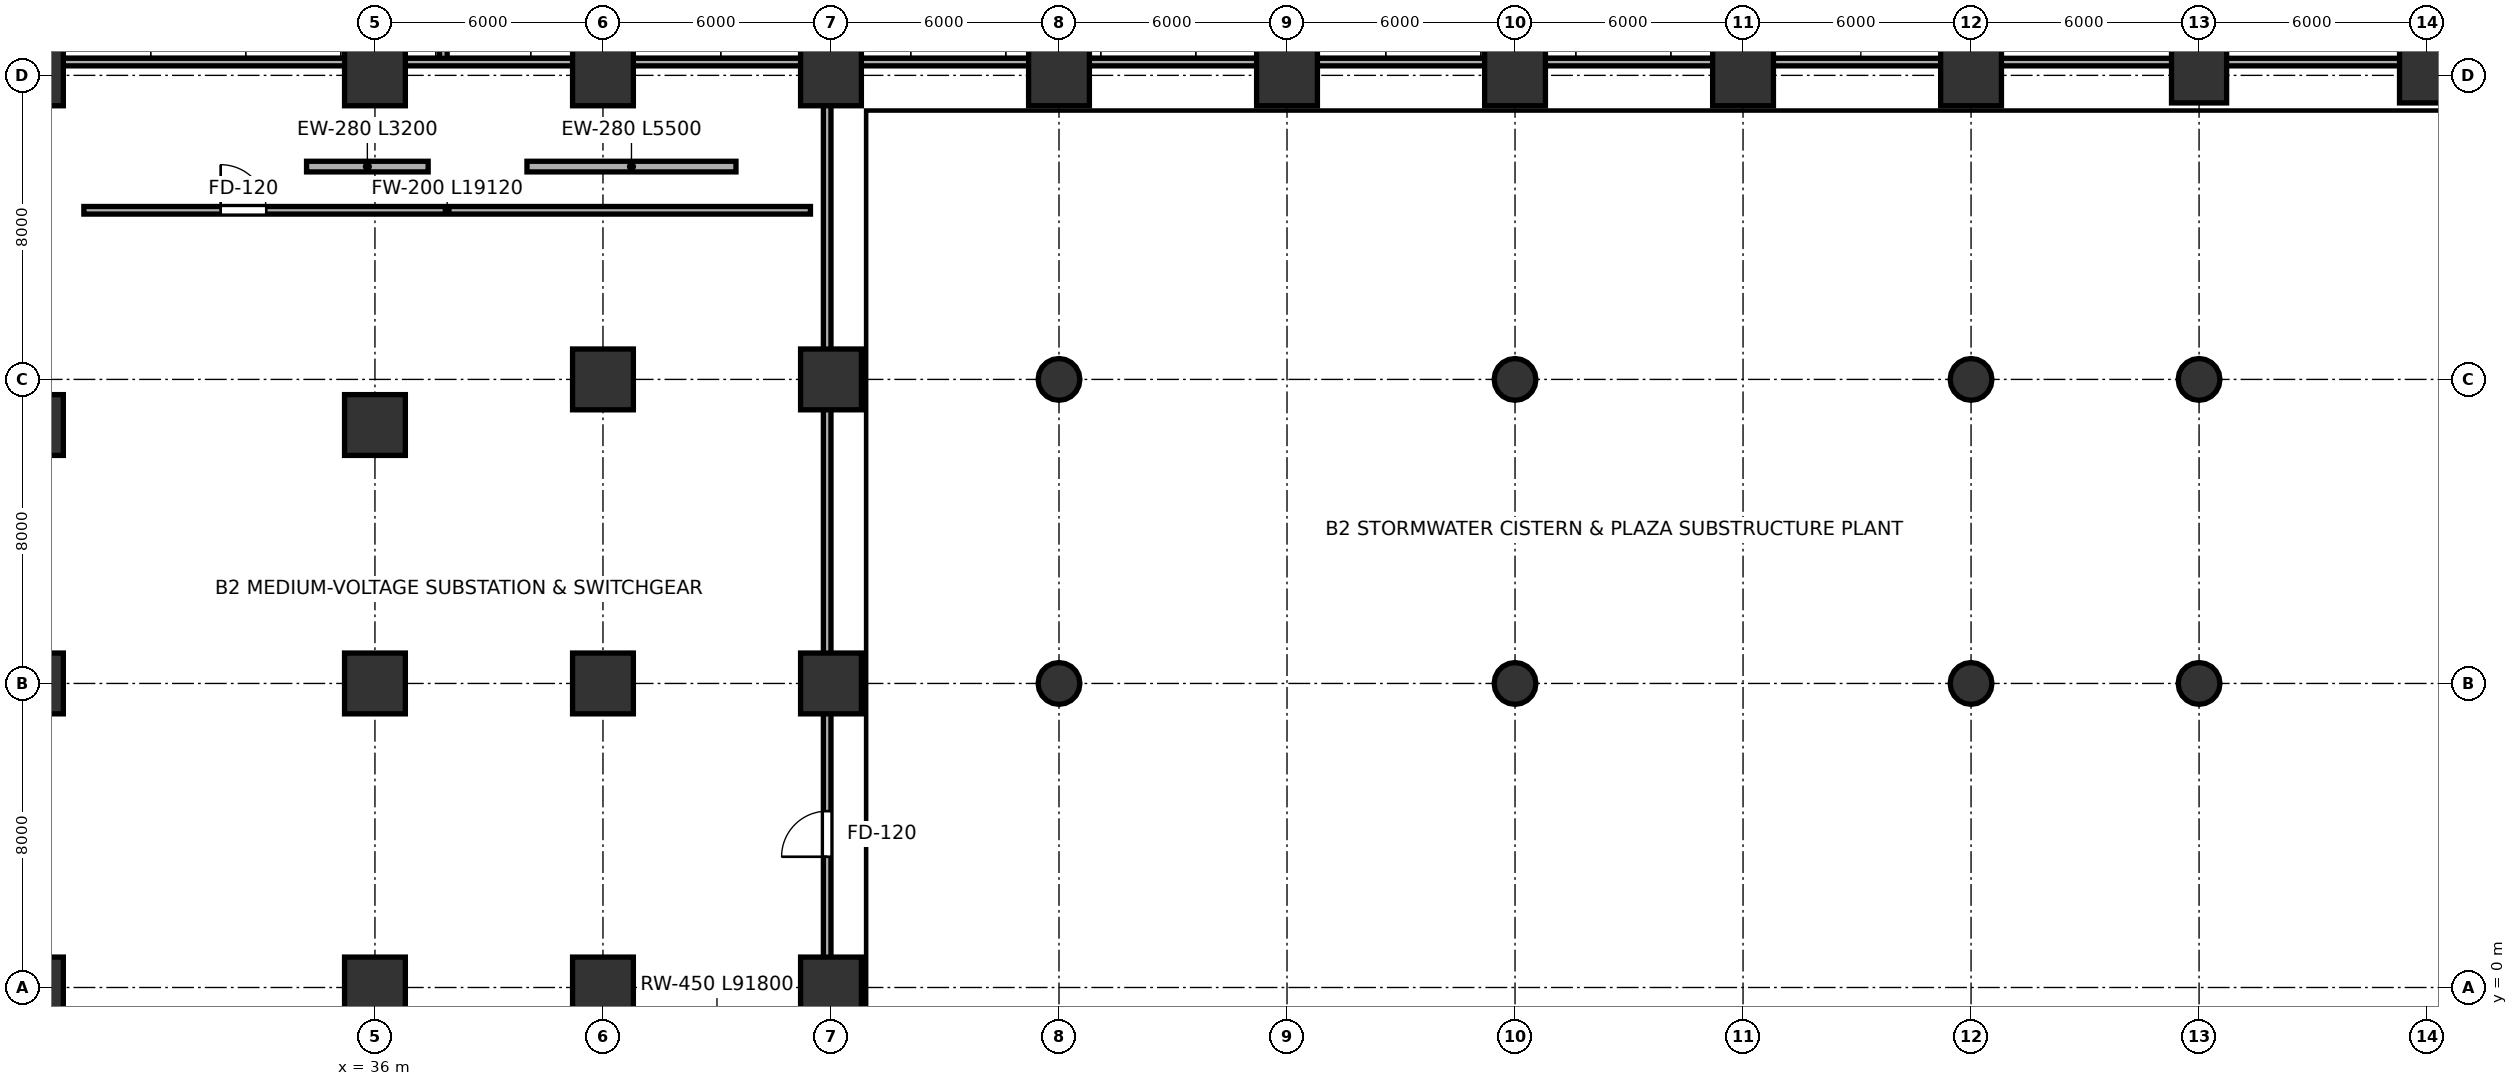
"""IFC4 building model, lengths in metres.
Left out: names, types, materials, properties, quantities, classifications, styles, units other than length and angle.
Written with IfcOpenShell. Run it as: python <this file> out.ifc"""

import sys

from ifc_helpers import new_model, si_unit, direction, frame, frame_2d, origin, origin_2d, place, context, subcontext, project, spatial, rectangle, circle, extrude, source, transform, mapped, element, fill, save


model = new_model("IFC4")
c1 = context("Model", 3, precision=1e-05, world=origin(), true_north=direction((0.0, 1.0)))
c2 = subcontext(c1, "Body", "Model", "MODEL_VIEW")
j1 = project(units=[si_unit("LENGTHUNIT", "METRE"), si_unit("PLANEANGLEUNIT", "RADIAN")], contexts=[c1])
p1 = place(None, origin())
s1 = spatial("IfcSite", under=j1, at=p1, CompositionType="ELEMENT")
p2 = place(p1, origin())
s2 = spatial("IfcBuilding", under=s1, at=p2, CompositionType="ELEMENT")
p3 = place(p2, frame((0.0, 0.0, -9.6)))
s3 = spatial("IfcBuildingStorey", under=s2, at=p3, CompositionType="ELEMENT", Elevation=-9.6)
m1 = source(origin(), c2, "Body", "SweptSolid", [
    extrude(rectangle(XDim=1.6, YDim=1.6, at=origin_2d()), origin(), (0.0, 0.0, 1.0), 4.799),
])
p4 = place(p3, frame((27.0, 0.0, 0.0), z_axis=(0.0, 0.0, 1.0), x_axis=(1.0, 0.0, 0.0)))
e1 = element("IfcColumn", 1, at=p4, inside=s3, PredefinedType="COLUMN", context=c2, shape_type="MappedRepresentation", body=[
    mapped(m1, transform((0.0, 0.0, 0.0), scale=1.0)),
])
m2 = source(origin(), c2, "Body", "SweptSolid", [
    extrude(rectangle(XDim=1.6, YDim=1.6, at=origin_2d()), origin(), (0.0, 0.0, 1.0), 4.799),
])
for number, where, z_axis, x_axis in (
    (2, (27.0, 8.0, 0.0), (0.0, 0.0, 1.0), (1.0, 0.0, 0.0)),
    (3, (27.0, 24.0, 0.0), (0.0, 0.0, 1.0), (1.0, 0.0, 0.0)),
    (4, (27.0, 14.8, 0.0), (0.0, 0.0, 1.0), (1.0, 0.0, 0.0)),
):
    element("IfcColumn", number, at=place(p3, frame(where, z_axis=z_axis, x_axis=x_axis)), inside=s3, PredefinedType="COLUMN", context=c2, shape_type="MappedRepresentation", body=[
        mapped(m2, transform((0.0, 0.0, 0.0), scale=1.0)),
    ])
p5 = place(p3, frame((36.0, 0.0, 0.0), z_axis=(0.0, 0.0, 1.0), x_axis=(1.0, 0.0, 0.0)))
e5 = element("IfcColumn", 5, at=p5, inside=s3, PredefinedType="COLUMN", context=c2, shape_type="MappedRepresentation", body=[
    mapped(m1, transform((0.0, 0.0, 0.0), scale=1.0)),
])
for number, where, z_axis, x_axis in (
    (6, (36.0, 8.0, 0.0), (0.0, 0.0, 1.0), (1.0, 0.0, 0.0)),
    (7, (36.0, 24.0, 0.0), (0.0, 0.0, 1.0), (1.0, 0.0, 0.0)),
    (8, (36.0, 14.8, 0.0), (0.0, 0.0, 1.0), (1.0, 0.0, 0.0)),
):
    element("IfcColumn", number, at=place(p3, frame(where, z_axis=z_axis, x_axis=x_axis)), inside=s3, PredefinedType="COLUMN", context=c2, shape_type="MappedRepresentation", body=[
        mapped(m2, transform((0.0, 0.0, 0.0), scale=1.0)),
    ])
p6 = place(p3, frame((42.0, 0.0, 0.0), z_axis=(0.0, 0.0, 1.0), x_axis=(1.0, 0.0, 0.0)))
e9 = element("IfcColumn", 9, at=p6, inside=s3, PredefinedType="COLUMN", context=c2, shape_type="MappedRepresentation", body=[
    mapped(m1, transform((0.0, 0.0, 0.0), scale=1.0)),
])
for number, where, z_axis, x_axis in (
    (10, (42.0, 8.0, 0.0), (0.0, 0.0, 1.0), (1.0, 0.0, 0.0)),
    (11, (42.0, 16.0, 0.0), (0.0, 0.0, 1.0), (1.0, 0.0, 0.0)),
    (12, (42.0, 24.0, 0.0), (0.0, 0.0, 1.0), (1.0, 0.0, 0.0)),
):
    element("IfcColumn", number, at=place(p3, frame(where, z_axis=z_axis, x_axis=x_axis)), inside=s3, PredefinedType="COLUMN", context=c2, shape_type="MappedRepresentation", body=[
        mapped(m2, transform((0.0, 0.0, 0.0), scale=1.0)),
    ])
p7 = place(p3, frame((48.0, 0.0, 0.0), z_axis=(0.0, 0.0, 1.0), x_axis=(1.0, 0.0, 0.0)))
e13 = element("IfcColumn", 13, at=p7, inside=s3, PredefinedType="COLUMN", context=c2, shape_type="MappedRepresentation", body=[
    mapped(m1, transform((0.0, 0.0, 0.0), scale=1.0)),
])
for number, where, z_axis, x_axis in (
    (14, (48.0, 8.0, 0.0), (0.0, 0.0, 1.0), (1.0, 0.0, 0.0)),
    (15, (48.0, 16.0, 0.0), (0.0, 0.0, 1.0), (1.0, 0.0, 0.0)),
    (16, (48.0, 24.0, 0.0), (0.0, 0.0, 1.0), (1.0, 0.0, 0.0)),
    (17, (54.0, 24.0, 0.0), (0.0, 0.0, 1.0), (1.0, 0.0, 0.0)),
    (18, (60.0, 24.0, 0.0), (0.0, 0.0, 1.0), (1.0, 0.0, 0.0)),
    (19, (66.0, 24.0, 0.0), (0.0, 0.0, 1.0), (1.0, 0.0, 0.0)),
    (20, (72.0, 24.0, 0.0), (0.0, 0.0, 1.0), (1.0, 0.0, 0.0)),
    (21, (78.0, 24.0, 0.0), (0.0, 0.0, 1.0), (1.0, 0.0, 0.0)),
):
    element("IfcColumn", number, at=place(p3, frame(where, z_axis=z_axis, x_axis=x_axis)), inside=s3, PredefinedType="COLUMN", context=c2, shape_type="MappedRepresentation", body=[
        mapped(m2, transform((0.0, 0.0, 0.0), scale=1.0)),
    ])
m3 = source(origin(), c2, "Body", "SweptSolid", [
    extrude(rectangle(XDim=1.45, YDim=1.45, at=origin_2d()), origin(), (0.0, 0.0, 1.0), 4.799),
])
p8 = place(p3, frame((84.0, 24.0, 0.0), z_axis=(0.0, 0.0, 1.0), x_axis=(1.0, 0.0, 0.0)))
e22 = element("IfcColumn", 22, at=p8, inside=s3, PredefinedType="COLUMN", context=c2, shape_type="MappedRepresentation", body=[
    mapped(m3, transform((0.0, 0.0, 0.0), scale=1.0)),
])
m4 = source(origin(), c2, "Body", "SweptSolid", [
    extrude(rectangle(XDim=1.45, YDim=1.45, at=origin_2d()), origin(), (0.0, 0.0, 1.0), 4.799),
])
p9 = place(p3, frame((90.0, 24.0, 0.0), z_axis=(0.0, 0.0, 1.0), x_axis=(1.0, 0.0, 0.0)))
e23 = element("IfcColumn", 23, at=p9, inside=s3, PredefinedType="COLUMN", context=c2, shape_type="MappedRepresentation", body=[
    mapped(m4, transform((0.0, 0.0, 0.0), scale=1.0)),
])
m5 = source(origin(), c2, "Body", "SweptSolid", [
    extrude(circle(Radius=0.55, at=origin_2d()), origin(), (0.0, 0.0, 1.0), 4.799),
])
for number, where, z_axis, x_axis in (
    (24, (54.0, 8.0, 0.0), (0.0, 0.0, 1.0), (1.0, 0.0, 0.0)),
    (25, (66.0, 8.0, 0.0), (0.0, 0.0, 1.0), (1.0, 0.0, 0.0)),
    (26, (78.0, 8.0, 0.0), (0.0, 0.0, 1.0), (1.0, 0.0, 0.0)),
    (27, (84.0, 8.0, 0.0), (0.0, 0.0, 1.0), (1.0, 0.0, 0.0)),
    (28, (54.0, 16.0, 0.0), (0.0, 0.0, 1.0), (1.0, 0.0, 0.0)),
    (29, (66.0, 16.0, 0.0), (0.0, 0.0, 1.0), (1.0, 0.0, 0.0)),
    (30, (78.0, 16.0, 0.0), (0.0, 0.0, 1.0), (1.0, 0.0, 0.0)),
    (31, (84.0, 16.0, 0.0), (0.0, 0.0, 1.0), (1.0, 0.0, 0.0)),
):
    element("IfcColumn", number, at=place(p3, frame(where, z_axis=z_axis, x_axis=x_axis)), inside=s3, PredefinedType="USERDEFINED", context=c2, shape_type="MappedRepresentation", body=[
        mapped(m5, transform((0.0, 0.0, 0.0), scale=1.0)),
    ])
p10 = place(p3, frame((34.2, 21.6, 0.0), z_axis=(0.0, 0.0, 1.0), x_axis=(1.0, 0.0, 0.0)))
e32 = element("IfcWall", 32, at=p10, inside=s3, PredefinedType="SOLIDWALL", context=c2, shape_type="SweptSolid", body=[
    extrude(rectangle(XDim=3.2, YDim=0.28, at=frame_2d((1.6, 0.0))), origin(), (0.0, 0.0, 1.0), 3.1),
])
p11 = place(p3, frame((40.0, 21.6, 0.0), z_axis=(0.0, 0.0, 1.0), x_axis=(1.0, 0.0, 0.0)))
e33 = element("IfcWall", 33, at=p11, inside=s3, PredefinedType="SOLIDWALL", context=c2, shape_type="SweptSolid", body=[
    extrude(rectangle(XDim=5.5, YDim=0.28, at=frame_2d((2.75, 0.0))), origin(), (0.0, 0.0, 1.0), 3.1),
])
p12 = place(p3, frame((28.34, 20.45, 0.0), z_axis=(0.0, 0.0, 1.0), x_axis=(1.0, 0.0, 0.0)))
e34 = element("IfcWall", 34, at=p12, inside=s3, PredefinedType="SOLIDWALL", context=c2, shape_type="SweptSolid", body=[
    extrude(rectangle(XDim=19.12, YDim=0.2, at=frame_2d((9.56, 0.0))), origin(), (0.0, 0.0, 1.0), 3.65),
])
p13 = place(p12, frame((3.6, 0.0, 0.0)))
e35 = element("IfcOpeningElement", 35, at=p13, cuts=e34, PredefinedType="OPENING", context=c2, shape_type="SweptSolid", body=[
    extrude(rectangle(XDim=1.2, YDim=2.2, at=frame_2d((0.6, 1.1))), frame((0.0, 0.11, 0.0), z_axis=(0.0, -1.0, 0.0), x_axis=(1.0, 0.0, 0.0)), (0.0, 0.0, 1.0), 0.22),
])
p14 = place(p3, frame((37.8, 24.39, 0.0), z_axis=(0.0, 0.0, 1.0), x_axis=(0.0, 1.0, 0.0)))
e36 = element("IfcWall", 36, at=p14, inside=s3, PredefinedType="SOLIDWALL", context=c2, shape_type="SweptSolid", body=[
    extrude(rectangle(XDim=37.42, YDim=0.2, at=frame_2d((18.71, 0.0))), origin(), (0.0, 0.0, 1.0), 3.655),
])
p15 = place(p14, frame((3.0, 0.0, 0.0)))
e37 = element("IfcOpeningElement", 37, at=p15, cuts=e36, PredefinedType="OPENING", context=c2, shape_type="SweptSolid", body=[
    extrude(rectangle(XDim=1.2, YDim=2.2, at=frame_2d((0.6, 1.1))), frame((0.0, 0.11, 0.0), z_axis=(0.0, -1.0, 0.0), x_axis=(1.0, 0.0, 0.0)), (0.0, 0.0, 1.0), 0.22),
])
p16 = place(p3, frame((27.24, 24.35, 0.0), z_axis=(0.0, 0.0, 1.0), x_axis=(1.0, 0.0, 0.0)))
e38 = element("IfcWall", 38, at=p16, inside=s3, PredefinedType="SOLIDWALL", context=c2, shape_type="SweptSolid", body=[
    extrude(rectangle(XDim=62.22, YDim=0.2, at=frame_2d((31.11, 0.0))), origin(), (0.0, 0.0, 1.0), 3.65),
])
p17 = place(p3, frame((47.9, -0.56, 0.0), z_axis=(0.0, 0.0, 1.0), x_axis=(0.0, 1.0, 0.0)))
e39 = element("IfcWall", 39, at=p17, inside=s3, PredefinedType="SOLIDWALL", context=c2, shape_type="SweptSolid", body=[
    extrude(rectangle(XDim=24.87, YDim=0.2, at=frame_2d((12.435, 0.0))), origin(), (0.0, 0.0, 1.0), 3.655),
])
p18 = place(p17, frame((4.0, 0.0, 0.0)))
e40 = element("IfcOpeningElement", 40, at=p18, cuts=e39, PredefinedType="OPENING", context=c2, shape_type="SweptSolid", body=[
    extrude(rectangle(XDim=1.2, YDim=2.2, at=frame_2d((0.6, 1.1))), frame((0.0, 0.11, 0.0), z_axis=(0.0, -1.0, 0.0), x_axis=(1.0, 0.0, 0.0)), (0.0, 0.0, 1.0), 0.22),
])
m6 = source(origin(), c2, "Body", "SweptSolid", [
    extrude(rectangle(XDim=1.2, YDim=2.2, at=frame_2d((0.6, 1.1))), frame((0.0, 0.025, 0.0), z_axis=(0.0, -1.0, 0.0), x_axis=(1.0, 0.0, 0.0)), (0.0, 0.0, 1.0), 0.05),
])
p19 = place(p13, origin())
e41 = element("IfcDoor", 41, at=p19, inside=s3, OperationType="SINGLE_SWING_LEFT", PredefinedType="DOOR", context=c2, shape_type="MappedRepresentation", body=[
    mapped(m6, transform((0.0, 0.0, 0.0), scale=1.0)),
])
fill(e35, e41)
p20 = place(p18, origin())
e42 = element("IfcDoor", 42, at=p20, inside=s3, OperationType="SINGLE_SWING_LEFT", PredefinedType="DOOR", context=c2, shape_type="MappedRepresentation", body=[
    mapped(m6, transform((0.0, 0.0, 0.0), scale=1.0)),
])
fill(e40, e42)
save(model, sys.argv[1])
